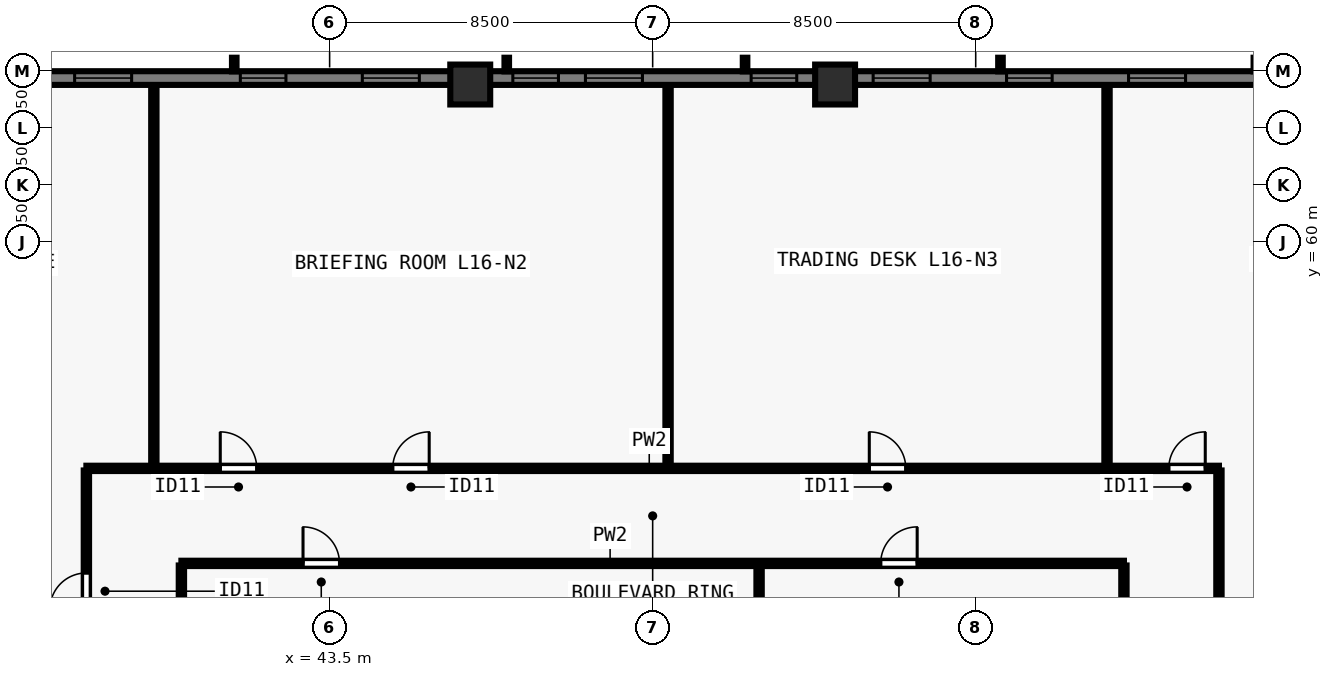
"""IFC4 building model, lengths in metres.
Left out: names, types, materials, properties, quantities, classifications, styles, units other than length and angle.
Written with IfcOpenShell. Run it as: python <this file> out.ifc"""

import sys

from ifc_helpers import new_model, si_unit, direction, frame, frame_2d, origin, origin_2d, place, context, subcontext, project, spatial, rectangle, extrude, element, fill, save


model = new_model("IFC4")
c1 = context("Model", 3, precision=1e-05, world=origin(), true_north=direction((0.0, 1.0)))
c2 = subcontext(c1, "Body", "Model", "MODEL_VIEW")
j1 = project(units=[si_unit("LENGTHUNIT", "METRE"), si_unit("PLANEANGLEUNIT", "RADIAN")], contexts=[c1])
p1 = place(None, origin())
s1 = spatial("IfcSite", under=j1, at=p1, CompositionType="ELEMENT")
p2 = place(p1, origin())
s2 = spatial("IfcBuilding", under=s1, at=p2, CompositionType="ELEMENT")
p3 = place(p2, frame((0.0, 0.0, 62.0)))
s3 = spatial("IfcBuildingStorey", under=s2, at=p3, CompositionType="ELEMENT", Elevation=62.0)
for number, where, z_axis, x_axis in (
    (1, (56.8, 64.15, 0.0), (0.0, 0.0, 1.0), (1.0, 0.0, 0.0)),
    (2, (47.2, 64.15, 0.0), (0.0, 0.0, 1.0), (1.0, 0.0, 0.0)),
):
    element("IfcColumn", number, at=place(p3, frame(where, z_axis=z_axis, x_axis=x_axis)), inside=s3, PredefinedType="COLUMN", context=c2, shape_type="SweptSolid", body=[
        extrude(rectangle(XDim=1.05, YDim=1.05, at=origin_2d()), origin(), (0.0, 0.0, 1.0), 3.5),
    ])
p4 = place(p3, frame((29.5, 64.32, 0.0), z_axis=(0.0, 0.0, 1.0), x_axis=(1.0, 0.0, 0.0)))
e3 = element("IfcWall", 3, at=p4, inside=s3, PredefinedType="SOLIDWALL", context=c2, shape_type="SweptSolid", body=[
    extrude(rectangle(XDim=44.662, YDim=0.36, at=frame_2d((22.331, 0.0))), origin(), (0.0, 0.0, 1.0), 3.28),
])
p5 = place(p4, frame((4.93, 0.0, 0.8)))
e4 = element("IfcOpeningElement", 4, at=p5, cuts=e3, PredefinedType="OPENING", context=c2, shape_type="SweptSolid", body=[
    extrude(rectangle(XDim=1.2, YDim=1.544, at=frame_2d((0.6, 0.772))), frame((0.0, 0.19, 0.0), z_axis=(0.0, -1.0, 0.0), x_axis=(1.0, 0.0, 0.0)), (0.0, 0.0, 1.0), 0.38),
])
p6 = place(p4, frame((7.29, 0.0, 0.8)))
e5 = element("IfcOpeningElement", 5, at=p6, cuts=e3, PredefinedType="OPENING", context=c2, shape_type="SweptSolid", body=[
    extrude(rectangle(XDim=1.5, YDim=1.544, at=frame_2d((0.75, 0.772))), frame((0.0, 0.19, 0.0), z_axis=(0.0, -1.0, 0.0), x_axis=(1.0, 0.0, 0.0)), (0.0, 0.0, 1.0), 0.38),
])
p7 = place(p4, frame((11.65, 0.0, 0.8)))
e6 = element("IfcOpeningElement", 6, at=p7, cuts=e3, PredefinedType="OPENING", context=c2, shape_type="SweptSolid", body=[
    extrude(rectangle(XDim=1.2, YDim=1.544, at=frame_2d((0.6, 0.772))), frame((0.0, 0.19, 0.0), z_axis=(0.0, -1.0, 0.0), x_axis=(1.0, 0.0, 0.0)), (0.0, 0.0, 1.0), 0.38),
])
p8 = place(p4, frame((14.861, 0.0, 0.8)))
e7 = element("IfcOpeningElement", 7, at=p8, cuts=e3, PredefinedType="OPENING", context=c2, shape_type="SweptSolid", body=[
    extrude(rectangle(XDim=1.5, YDim=1.544, at=frame_2d((0.75, 0.772))), frame((0.0, 0.19, 0.0), z_axis=(0.0, -1.0, 0.0), x_axis=(1.0, 0.0, 0.0)), (0.0, 0.0, 1.0), 0.38),
])
p9 = place(p4, frame((18.821, 0.0, 0.8)))
e8 = element("IfcOpeningElement", 8, at=p9, cuts=e3, PredefinedType="OPENING", context=c2, shape_type="SweptSolid", body=[
    extrude(rectangle(XDim=1.2, YDim=1.544, at=frame_2d((0.6, 0.772))), frame((0.0, 0.19, 0.0), z_axis=(0.0, -1.0, 0.0), x_axis=(1.0, 0.0, 0.0)), (0.0, 0.0, 1.0), 0.38),
])
p10 = place(p4, frame((20.731, 0.0, 0.8)))
e9 = element("IfcOpeningElement", 9, at=p10, cuts=e3, PredefinedType="OPENING", context=c2, shape_type="SweptSolid", body=[
    extrude(rectangle(XDim=1.5, YDim=1.544, at=frame_2d((0.75, 0.772))), frame((0.0, 0.19, 0.0), z_axis=(0.0, -1.0, 0.0), x_axis=(1.0, 0.0, 0.0)), (0.0, 0.0, 1.0), 0.38),
])
p11 = place(p4, frame((25.091, 0.0, 0.8)))
e10 = element("IfcOpeningElement", 10, at=p11, cuts=e3, PredefinedType="OPENING", context=c2, shape_type="SweptSolid", body=[
    extrude(rectangle(XDim=1.2, YDim=1.544, at=frame_2d((0.6, 0.772))), frame((0.0, 0.19, 0.0), z_axis=(0.0, -1.0, 0.0), x_axis=(1.0, 0.0, 0.0)), (0.0, 0.0, 1.0), 0.38),
])
p12 = place(p4, frame((28.302, 0.0, 0.8)))
e11 = element("IfcOpeningElement", 11, at=p12, cuts=e3, PredefinedType="OPENING", context=c2, shape_type="SweptSolid", body=[
    extrude(rectangle(XDim=1.5, YDim=1.544, at=frame_2d((0.75, 0.772))), frame((0.0, 0.19, 0.0), z_axis=(0.0, -1.0, 0.0), x_axis=(1.0, 0.0, 0.0)), (0.0, 0.0, 1.0), 0.38),
])
p13 = place(p4, frame((31.812, 0.0, 0.8)))
e12 = element("IfcOpeningElement", 12, at=p13, cuts=e3, PredefinedType="OPENING", context=c2, shape_type="SweptSolid", body=[
    extrude(rectangle(XDim=1.2, YDim=1.544, at=frame_2d((0.6, 0.772))), frame((0.0, 0.19, 0.0), z_axis=(0.0, -1.0, 0.0), x_axis=(1.0, 0.0, 0.0)), (0.0, 0.0, 1.0), 0.38),
])
p14 = place(p4, frame((35.022, 0.0, 0.8)))
e13 = element("IfcOpeningElement", 13, at=p14, cuts=e3, PredefinedType="OPENING", context=c2, shape_type="SweptSolid", body=[
    extrude(rectangle(XDim=1.5, YDim=1.544, at=frame_2d((0.75, 0.772))), frame((0.0, 0.19, 0.0), z_axis=(0.0, -1.0, 0.0), x_axis=(1.0, 0.0, 0.0)), (0.0, 0.0, 1.0), 0.38),
])
p15 = place(p4, frame((38.532, 0.0, 0.8)))
e14 = element("IfcOpeningElement", 14, at=p15, cuts=e3, PredefinedType="OPENING", context=c2, shape_type="SweptSolid", body=[
    extrude(rectangle(XDim=1.2, YDim=1.544, at=frame_2d((0.6, 0.772))), frame((0.0, 0.19, 0.0), z_axis=(0.0, -1.0, 0.0), x_axis=(1.0, 0.0, 0.0)), (0.0, 0.0, 1.0), 0.38),
])
p16 = place(p3, frame((37.1, 54.05, 0.0), z_axis=(0.0, 0.0, 1.0), x_axis=(1.0, 0.0, 0.0)))
e15 = element("IfcWall", 15, at=p16, inside=s3, PredefinedType="PARTITIONING", context=c2, shape_type="SweptSolid", body=[
    extrude(rectangle(XDim=29.8, YDim=0.14, at=frame_2d((14.9, 0.0))), origin(), (0.0, 0.0, 1.0), 3.28),
])
p17 = place(p16, frame((3.522, 0.0, 0.0)))
e16 = element("IfcOpeningElement", 16, at=p17, cuts=e15, PredefinedType="OPENING", context=c2, shape_type="SweptSolid", body=[
    extrude(rectangle(XDim=0.96, YDim=2.12, at=frame_2d((0.48, 1.06))), frame((0.0, 0.08, 0.0), z_axis=(0.0, -1.0, 0.0), x_axis=(1.0, 0.0, 0.0)), (0.0, 0.0, 1.0), 0.16),
])
p18 = place(p16, frame((8.06, 0.0, 0.0)))
e17 = element("IfcOpeningElement", 17, at=p18, cuts=e15, PredefinedType="OPENING", context=c2, shape_type="SweptSolid", body=[
    extrude(rectangle(XDim=0.96, YDim=2.12, at=frame_2d((0.48, 1.06))), frame((0.0, 0.08, 0.0), z_axis=(0.0, -1.0, 0.0), x_axis=(1.0, 0.0, 0.0)), (0.0, 0.0, 1.0), 0.16),
])
p19 = place(p16, frame((20.6, 0.0, 0.0)))
e18 = element("IfcOpeningElement", 18, at=p19, cuts=e15, PredefinedType="OPENING", context=c2, shape_type="SweptSolid", body=[
    extrude(rectangle(XDim=0.96, YDim=2.12, at=frame_2d((0.48, 1.06))), frame((0.0, 0.08, 0.0), z_axis=(0.0, -1.0, 0.0), x_axis=(1.0, 0.0, 0.0)), (0.0, 0.0, 1.0), 0.16),
])
p20 = place(p16, frame((28.48, 0.0, 0.0)))
e19 = element("IfcOpeningElement", 19, at=p20, cuts=e15, PredefinedType="OPENING", context=c2, shape_type="SweptSolid", body=[
    extrude(rectangle(XDim=0.96, YDim=2.12, at=frame_2d((0.48, 1.06))), frame((0.0, 0.08, 0.0), z_axis=(0.0, -1.0, 0.0), x_axis=(1.0, 0.0, 0.0)), (0.0, 0.0, 1.0), 0.16),
])
p21 = place(p3, frame((37.1, 24.005, 0.0), z_axis=(0.0, 0.0, 1.0), x_axis=(0.0, 1.0, 0.0)))
e20 = element("IfcWall", 20, at=p21, inside=s3, PredefinedType="PARTITIONING", context=c2, shape_type="SweptSolid", body=[
    extrude(rectangle(XDim=29.99, YDim=0.14, at=frame_2d((14.995, 0.0))), origin(), (0.0, 0.0, 1.0), 3.28),
])
p22 = place(p21, frame((2.76, 0.0, 0.0)))
e21 = element("IfcOpeningElement", 21, at=p22, cuts=e20, PredefinedType="OPENING", context=c2, shape_type="SweptSolid", body=[
    extrude(rectangle(XDim=0.96, YDim=2.12, at=frame_2d((0.48, 1.06))), frame((0.0, 0.08, 0.0), z_axis=(0.0, -1.0, 0.0), x_axis=(1.0, 0.0, 0.0)), (0.0, 0.0, 1.0), 0.16),
])
p23 = place(p21, frame((8.598, 0.0, 0.0)))
e22 = element("IfcOpeningElement", 22, at=p23, cuts=e20, PredefinedType="OPENING", context=c2, shape_type="SweptSolid", body=[
    extrude(rectangle(XDim=0.96, YDim=2.12, at=frame_2d((0.48, 1.06))), frame((0.0, 0.08, 0.0), z_axis=(0.0, -1.0, 0.0), x_axis=(1.0, 0.0, 0.0)), (0.0, 0.0, 1.0), 0.16),
])
p24 = place(p21, frame((14.578, 0.0, 0.0)))
e23 = element("IfcOpeningElement", 23, at=p24, cuts=e20, PredefinedType="OPENING", context=c2, shape_type="SweptSolid", body=[
    extrude(rectangle(XDim=0.96, YDim=2.12, at=frame_2d((0.48, 1.06))), frame((0.0, 0.08, 0.0), z_axis=(0.0, -1.0, 0.0), x_axis=(1.0, 0.0, 0.0)), (0.0, 0.0, 1.0), 0.16),
])
p25 = place(p21, frame((20.558, 0.0, 0.0)))
e24 = element("IfcOpeningElement", 24, at=p25, cuts=e20, PredefinedType="OPENING", context=c2, shape_type="SweptSolid", body=[
    extrude(rectangle(XDim=0.96, YDim=2.12, at=frame_2d((0.48, 1.06))), frame((0.0, 0.08, 0.0), z_axis=(0.0, -1.0, 0.0), x_axis=(1.0, 0.0, 0.0)), (0.0, 0.0, 1.0), 0.16),
])
p26 = place(p21, frame((26.333, 0.0, 0.0)))
e25 = element("IfcOpeningElement", 25, at=p26, cuts=e20, PredefinedType="OPENING", context=c2, shape_type="SweptSolid", body=[
    extrude(rectangle(XDim=0.96, YDim=2.12, at=frame_2d((0.48, 1.06))), frame((0.0, 0.08, 0.0), z_axis=(0.0, -1.0, 0.0), x_axis=(1.0, 0.0, 0.0)), (0.0, 0.0, 1.0), 0.16),
])
p27 = place(p3, frame((66.9, 24.005, 0.0), z_axis=(0.0, 0.0, 1.0), x_axis=(0.0, 1.0, 0.0)))
e26 = element("IfcWall", 26, at=p27, inside=s3, PredefinedType="PARTITIONING", context=c2, shape_type="SweptSolid", body=[
    extrude(rectangle(XDim=29.99, YDim=0.14, at=frame_2d((14.995, 0.0))), origin(), (0.0, 0.0, 1.0), 3.28),
])
p28 = place(p27, frame((4.344, 0.0, 0.0)))
e27 = element("IfcOpeningElement", 27, at=p28, cuts=e26, PredefinedType="OPENING", context=c2, shape_type="SweptSolid", body=[
    extrude(rectangle(XDim=0.96, YDim=2.12, at=frame_2d((0.48, 1.06))), frame((0.0, 0.08, 0.0), z_axis=(0.0, -1.0, 0.0), x_axis=(1.0, 0.0, 0.0)), (0.0, 0.0, 1.0), 0.16),
])
p29 = place(p27, frame((14.452, 0.0, 0.0)))
e28 = element("IfcOpeningElement", 28, at=p29, cuts=e26, PredefinedType="OPENING", context=c2, shape_type="SweptSolid", body=[
    extrude(rectangle(XDim=0.96, YDim=2.12, at=frame_2d((0.48, 1.06))), frame((0.0, 0.08, 0.0), z_axis=(0.0, -1.0, 0.0), x_axis=(1.0, 0.0, 0.0)), (0.0, 0.0, 1.0), 0.16),
])
p30 = place(p27, frame((24.623, 0.0, 0.0)))
e29 = element("IfcOpeningElement", 29, at=p30, cuts=e26, PredefinedType="OPENING", context=c2, shape_type="SweptSolid", body=[
    extrude(rectangle(XDim=0.96, YDim=2.12, at=frame_2d((0.48, 1.06))), frame((0.0, 0.08, 0.0), z_axis=(0.0, -1.0, 0.0), x_axis=(1.0, 0.0, 0.0)), (0.0, 0.0, 1.0), 0.16),
])
p31 = place(p3, frame((39.6, 51.55, 0.0), z_axis=(0.0, 0.0, 1.0), x_axis=(1.0, 0.0, 0.0)))
e30 = element("IfcWall", 30, at=p31, inside=s3, PredefinedType="PARTITIONING", context=c2, shape_type="SweptSolid", body=[
    extrude(rectangle(XDim=24.8, YDim=0.14, at=frame_2d((12.4, 0.0))), origin(), (0.0, 0.0, 1.0), 3.28),
])
p32 = place(p31, frame((3.2, 0.0, 0.0)))
e31 = element("IfcOpeningElement", 31, at=p32, cuts=e30, PredefinedType="OPENING", context=c2, shape_type="SweptSolid", body=[
    extrude(rectangle(XDim=0.96, YDim=2.12, at=frame_2d((0.48, 1.06))), frame((0.0, 0.08, 0.0), z_axis=(0.0, -1.0, 0.0), x_axis=(1.0, 0.0, 0.0)), (0.0, 0.0, 1.0), 0.16),
])
p33 = place(p31, frame((18.4, 0.0, 0.0)))
e32 = element("IfcOpeningElement", 32, at=p33, cuts=e30, PredefinedType="OPENING", context=c2, shape_type="SweptSolid", body=[
    extrude(rectangle(XDim=0.96, YDim=2.12, at=frame_2d((0.48, 1.06))), frame((0.0, 0.08, 0.0), z_axis=(0.0, -1.0, 0.0), x_axis=(1.0, 0.0, 0.0)), (0.0, 0.0, 1.0), 0.16),
])
p34 = place(p3, frame((39.6, 40.8, 0.0), z_axis=(0.0, 0.0, 1.0), x_axis=(0.0, 1.0, 0.0)))
e33 = element("IfcWall", 33, at=p34, inside=s3, PredefinedType="PARTITIONING", context=c2, shape_type="SweptSolid", body=[
    extrude(rectangle(XDim=10.695, YDim=0.14, at=frame_2d((5.348, 0.0))), origin(), (0.0, 0.0, 1.0), 3.28),
])
p35 = place(p34, frame((2.5, 0.0, 0.0)))
e34 = element("IfcOpeningElement", 34, at=p35, cuts=e33, PredefinedType="OPENING", context=c2, shape_type="SweptSolid", body=[
    extrude(rectangle(XDim=0.88, YDim=2.1, at=frame_2d((0.44, 1.05))), frame((0.0, 0.08, 0.0), z_axis=(0.0, -1.0, 0.0), x_axis=(1.0, 0.0, 0.0)), (0.0, 0.0, 1.0), 0.16),
])
p36 = place(p3, frame((64.4, 40.8, 0.0), z_axis=(0.0, 0.0, 1.0), x_axis=(0.0, 1.0, 0.0)))
e35 = element("IfcWall", 35, at=p36, inside=s3, PredefinedType="PARTITIONING", context=c2, shape_type="SweptSolid", body=[
    extrude(rectangle(XDim=10.695, YDim=0.14, at=frame_2d((5.348, 0.0))), origin(), (0.0, 0.0, 1.0), 3.28),
])
p37 = place(p36, frame((2.5, 0.0, 0.0)))
e36 = element("IfcOpeningElement", 36, at=p37, cuts=e35, PredefinedType="OPENING", context=c2, shape_type="SweptSolid", body=[
    extrude(rectangle(XDim=0.88, YDim=2.1, at=frame_2d((0.44, 1.05))), frame((0.0, 0.08, 0.0), z_axis=(0.0, -1.0, 0.0), x_axis=(1.0, 0.0, 0.0)), (0.0, 0.0, 1.0), 0.16),
])
p38 = place(p3, frame((54.8, 47.76, 0.0), z_axis=(0.0, 0.0, 1.0), x_axis=(0.0, 1.0, 0.0)))
e37 = element("IfcWall", 37, at=p38, inside=s3, PredefinedType="PARTITIONING", context=c2, shape_type="SweptSolid", body=[
    extrude(rectangle(XDim=3.735, YDim=0.14, at=frame_2d((1.868, 0.0))), origin(), (0.0, 0.0, 1.0), 3.28),
])
p39 = place(p3, frame((38.875, 54.15, 0.0), z_axis=(0.0, 0.0, 1.0), x_axis=(0.0, 1.0, 0.0)))
e38 = element("IfcWall", 38, at=p39, inside=s3, PredefinedType="PARTITIONING", context=c2, shape_type="SweptSolid", body=[
    extrude(rectangle(XDim=9.93, YDim=0.14, at=frame_2d((4.965, 0.0))), origin(), (0.0, 0.0, 1.0), 3.28),
])
p40 = place(p3, frame((52.405, 54.15, 0.0), z_axis=(0.0, 0.0, 1.0), x_axis=(0.0, 1.0, 0.0)))
e39 = element("IfcWall", 39, at=p40, inside=s3, PredefinedType="PARTITIONING", context=c2, shape_type="SweptSolid", body=[
    extrude(rectangle(XDim=9.93, YDim=0.14, at=frame_2d((4.965, 0.0))), origin(), (0.0, 0.0, 1.0), 2.849),
])
p41 = place(p3, frame((63.955, 54.15, 0.0), z_axis=(0.0, 0.0, 1.0), x_axis=(0.0, 1.0, 0.0)))
e40 = element("IfcWall", 40, at=p41, inside=s3, PredefinedType="PARTITIONING", context=c2, shape_type="SweptSolid", body=[
    extrude(rectangle(XDim=9.93, YDim=0.14, at=frame_2d((4.965, 0.0))), origin(), (0.0, 0.0, 1.0), 3.28),
])
p42 = place(p6, origin())
e41 = element("IfcWindow", 41, at=p42, inside=s3, PartitioningType="SINGLE_PANEL", PredefinedType="WINDOW", context=c2, shape_type="SweptSolid", body=[
    extrude(rectangle(XDim=1.5, YDim=1.544, at=frame_2d((0.75, 0.772))), frame((0.0, -0.05, 0.0), z_axis=(0.0, -1.0, 0.0), x_axis=(1.0, 0.0, 0.0)), (0.0, 0.0, 1.0), 0.06),
])
fill(e5, e41)
p43 = place(p7, origin())
e42 = element("IfcWindow", 42, at=p43, inside=s3, PartitioningType="SINGLE_PANEL", PredefinedType="WINDOW", context=c2, shape_type="SweptSolid", body=[
    extrude(rectangle(XDim=1.2, YDim=1.544, at=frame_2d((0.6, 0.772))), frame((0.0, -0.05, 0.0), z_axis=(0.0, -1.0, 0.0), x_axis=(1.0, 0.0, 0.0)), (0.0, 0.0, 1.0), 0.06),
])
fill(e6, e42)
p44 = place(p8, origin())
e43 = element("IfcWindow", 43, at=p44, inside=s3, PartitioningType="SINGLE_PANEL", PredefinedType="WINDOW", context=c2, shape_type="SweptSolid", body=[
    extrude(rectangle(XDim=1.5, YDim=1.544, at=frame_2d((0.75, 0.772))), frame((0.0, -0.05, 0.0), z_axis=(0.0, -1.0, 0.0), x_axis=(1.0, 0.0, 0.0)), (0.0, 0.0, 1.0), 0.06),
])
fill(e7, e43)
p45 = place(p9, origin())
e44 = element("IfcWindow", 44, at=p45, inside=s3, PartitioningType="SINGLE_PANEL", PredefinedType="WINDOW", context=c2, shape_type="SweptSolid", body=[
    extrude(rectangle(XDim=1.2, YDim=1.544, at=frame_2d((0.6, 0.772))), frame((0.0, -0.05, 0.0), z_axis=(0.0, -1.0, 0.0), x_axis=(1.0, 0.0, 0.0)), (0.0, 0.0, 1.0), 0.06),
])
fill(e8, e44)
p46 = place(p10, origin())
e45 = element("IfcWindow", 45, at=p46, inside=s3, PartitioningType="SINGLE_PANEL", PredefinedType="WINDOW", context=c2, shape_type="SweptSolid", body=[
    extrude(rectangle(XDim=1.5, YDim=1.544, at=frame_2d((0.75, 0.772))), frame((0.0, -0.05, 0.0), z_axis=(0.0, -1.0, 0.0), x_axis=(1.0, 0.0, 0.0)), (0.0, 0.0, 1.0), 0.06),
])
fill(e9, e45)
p47 = place(p11, origin())
e46 = element("IfcWindow", 46, at=p47, inside=s3, PartitioningType="SINGLE_PANEL", PredefinedType="WINDOW", context=c2, shape_type="SweptSolid", body=[
    extrude(rectangle(XDim=1.2, YDim=1.544, at=frame_2d((0.6, 0.772))), frame((0.0, -0.05, 0.0), z_axis=(0.0, -1.0, 0.0), x_axis=(1.0, 0.0, 0.0)), (0.0, 0.0, 1.0), 0.06),
])
fill(e10, e46)
p48 = place(p12, origin())
e47 = element("IfcWindow", 47, at=p48, inside=s3, PartitioningType="SINGLE_PANEL", PredefinedType="WINDOW", context=c2, shape_type="SweptSolid", body=[
    extrude(rectangle(XDim=1.5, YDim=1.544, at=frame_2d((0.75, 0.772))), frame((0.0, -0.05, 0.0), z_axis=(0.0, -1.0, 0.0), x_axis=(1.0, 0.0, 0.0)), (0.0, 0.0, 1.0), 0.06),
])
fill(e11, e47)
p49 = place(p13, origin())
e48 = element("IfcWindow", 48, at=p49, inside=s3, PartitioningType="SINGLE_PANEL", PredefinedType="WINDOW", context=c2, shape_type="SweptSolid", body=[
    extrude(rectangle(XDim=1.2, YDim=1.544, at=frame_2d((0.6, 0.772))), frame((0.0, -0.05, 0.0), z_axis=(0.0, -1.0, 0.0), x_axis=(1.0, 0.0, 0.0)), (0.0, 0.0, 1.0), 0.06),
])
fill(e12, e48)
p50 = place(p14, origin())
e49 = element("IfcWindow", 49, at=p50, inside=s3, PartitioningType="SINGLE_PANEL", PredefinedType="WINDOW", context=c2, shape_type="SweptSolid", body=[
    extrude(rectangle(XDim=1.5, YDim=1.544, at=frame_2d((0.75, 0.772))), frame((0.0, -0.05, 0.0), z_axis=(0.0, -1.0, 0.0), x_axis=(1.0, 0.0, 0.0)), (0.0, 0.0, 1.0), 0.06),
])
fill(e13, e49)
p51 = place(p32, origin())
e50 = element("IfcDoor", 50, at=p51, inside=s3, OperationType="SINGLE_SWING_LEFT", PredefinedType="DOOR", context=c2, shape_type="SweptSolid", body=[
    extrude(rectangle(XDim=0.96, YDim=2.12, at=frame_2d((0.48, 1.06))), frame((0.0, 0.025, 0.0), z_axis=(0.0, -1.0, 0.0), x_axis=(1.0, 0.0, 0.0)), (0.0, 0.0, 1.0), 0.05),
])
fill(e31, e50)
p52 = place(p33, origin())
e51 = element("IfcDoor", 51, at=p52, inside=s3, OperationType="SINGLE_SWING_RIGHT", PredefinedType="DOOR", context=c2, shape_type="SweptSolid", body=[
    extrude(rectangle(XDim=0.96, YDim=2.12, at=frame_2d((0.48, 1.06))), frame((0.0, 0.025, 0.0), z_axis=(0.0, -1.0, 0.0), x_axis=(1.0, 0.0, 0.0)), (0.0, 0.0, 1.0), 0.05),
])
fill(e32, e51)
p53 = place(p17, origin())
e52 = element("IfcDoor", 52, at=p53, inside=s3, OperationType="SINGLE_SWING_LEFT", PredefinedType="DOOR", context=c2, shape_type="SweptSolid", body=[
    extrude(rectangle(XDim=0.96, YDim=2.12, at=frame_2d((0.48, 1.06))), frame((0.0, 0.025, 0.0), z_axis=(0.0, -1.0, 0.0), x_axis=(1.0, 0.0, 0.0)), (0.0, 0.0, 1.0), 0.05),
])
fill(e16, e52)
p54 = place(p18, origin())
e53 = element("IfcDoor", 53, at=p54, inside=s3, OperationType="SINGLE_SWING_RIGHT", PredefinedType="DOOR", context=c2, shape_type="SweptSolid", body=[
    extrude(rectangle(XDim=0.96, YDim=2.12, at=frame_2d((0.48, 1.06))), frame((0.0, 0.025, 0.0), z_axis=(0.0, -1.0, 0.0), x_axis=(1.0, 0.0, 0.0)), (0.0, 0.0, 1.0), 0.05),
])
fill(e17, e53)
p55 = place(p19, origin())
e54 = element("IfcDoor", 54, at=p55, inside=s3, OperationType="SINGLE_SWING_LEFT", PredefinedType="DOOR", context=c2, shape_type="SweptSolid", body=[
    extrude(rectangle(XDim=0.96, YDim=2.12, at=frame_2d((0.48, 1.06))), frame((0.0, 0.025, 0.0), z_axis=(0.0, -1.0, 0.0), x_axis=(1.0, 0.0, 0.0)), (0.0, 0.0, 1.0), 0.05),
])
fill(e18, e54)
p56 = place(p20, origin())
e55 = element("IfcDoor", 55, at=p56, inside=s3, OperationType="SINGLE_SWING_RIGHT", PredefinedType="DOOR", context=c2, shape_type="SweptSolid", body=[
    extrude(rectangle(XDim=0.96, YDim=2.12, at=frame_2d((0.48, 1.06))), frame((0.0, 0.025, 0.0), z_axis=(0.0, -1.0, 0.0), x_axis=(1.0, 0.0, 0.0)), (0.0, 0.0, 1.0), 0.05),
])
fill(e19, e55)
p57 = place(p26, origin())
e56 = element("IfcDoor", 56, at=p57, inside=s3, OperationType="SINGLE_SWING_LEFT", PredefinedType="DOOR", context=c2, shape_type="SweptSolid", body=[
    extrude(rectangle(XDim=0.96, YDim=2.12, at=frame_2d((0.48, 1.06))), frame((0.0, 0.025, 0.0), z_axis=(0.0, -1.0, 0.0), x_axis=(1.0, 0.0, 0.0)), (0.0, 0.0, 1.0), 0.05),
])
fill(e25, e56)
save(model, sys.argv[1])
